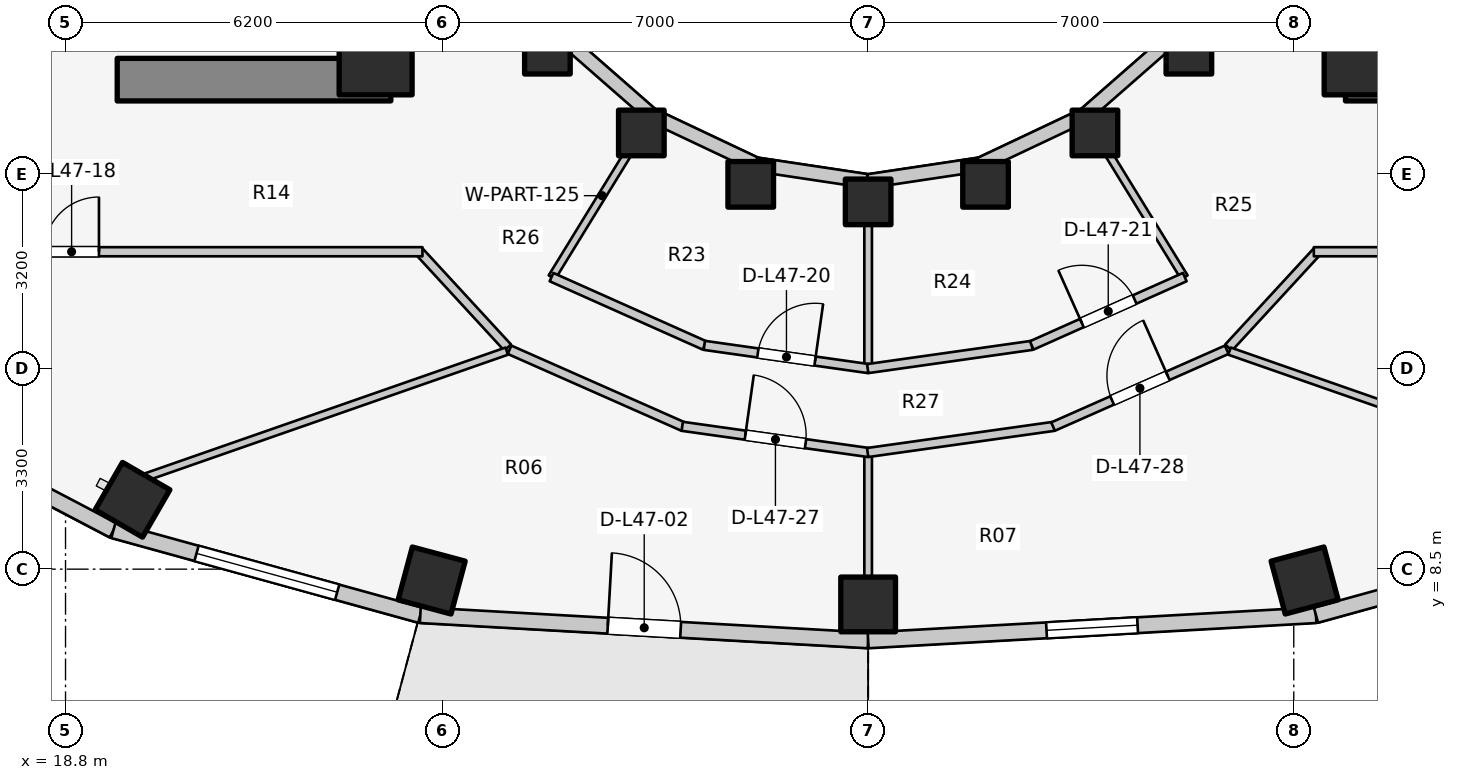
"""IFC4 building model, lengths in metres.
Left out: names, types, materials, properties, quantities, classifications, styles, units other than length and angle.
Written with IfcOpenShell. Run it as: python <this file> out.ifc"""

import sys

from ifc_helpers import new_model, si_unit, direction, frame, frame_2d, origin, origin_2d, place, context, subcontext, project, spatial, rectangle, extrude, element, fill, save


model = new_model("IFC4")
c1 = context("Model", 3, precision=1e-05, world=origin(), true_north=direction((0.0, 1.0)))
c2 = subcontext(c1, "Body", "Model", "MODEL_VIEW")
j1 = project(units=[si_unit("LENGTHUNIT", "METRE"), si_unit("PLANEANGLEUNIT", "RADIAN")], contexts=[c1])
p1 = place(None, origin())
s1 = spatial("IfcSite", under=j1, at=p1, CompositionType="ELEMENT")
p2 = place(p1, origin())
s2 = spatial("IfcBuilding", under=s1, at=p2, CompositionType="ELEMENT")
p3 = place(p2, frame((0.0, 0.0, 156.0)))
s3 = spatial("IfcBuildingStorey", under=s2, at=p3, CompositionType="ELEMENT", Elevation=156.0)
for number, where, z_axis, x_axis in (
    (1, (19.65, 16.55, 0.0), (0.0, 0.0, 1.0), (1.0, 0.0, 0.0)),
    (2, (39.85, 16.55, 0.0), (0.0, 0.0, 1.0), (1.0, 0.0, 0.0)),
):
    element("IfcWall", number, at=place(p3, frame(where, z_axis=z_axis, x_axis=x_axis)), inside=s3, PredefinedType="SHEAR", context=c2, shape_type="SweptSolid", body=[
        extrude(rectangle(XDim=4.5, YDim=0.7, at=frame_2d((2.25, 0.0))), origin(), (0.0, 0.0, 1.0), 3.1),
    ])
for number, where, z_axis, x_axis in (
    (3, (23.9, 16.9, 0.0), (0.0, 0.0, 1.0), (1.0, 0.0, 0.0)),
    (4, (40.1, 16.9, 0.0), (0.0, 0.0, 1.0), (1.0, 0.0, 0.0)),
):
    element("IfcColumn", number, at=place(p3, frame(where, z_axis=z_axis, x_axis=x_axis)), inside=s3, PredefinedType="COLUMN", context=c2, shape_type="SweptSolid", body=[
        extrude(rectangle(XDim=1.2, YDim=1.2, at=origin_2d()), origin(), (0.0, 0.0, 1.0), 3.1),
    ])
for number, where, z_axis, x_axis in (
    (5, (26.725, 17.018, 0.0), (0.0, 0.0, 1.0), (1.0, 0.0, 0.0)),
    (6, (28.27, 15.673, 0.0), (0.0, 0.0, 1.0), (1.0, 0.0, 0.0)),
):
    element("IfcColumn", number, at=place(p3, frame(where, z_axis=z_axis, x_axis=x_axis)), inside=s3, PredefinedType="COLUMN", context=c2, shape_type="SweptSolid", body=[
        extrude(rectangle(XDim=0.75, YDim=0.75, at=origin_2d()), origin(), (0.0, 0.0, 1.0), 3.1),
    ])
p4 = place(p3, frame((19.902, 9.641, 0.0), z_axis=(0.0, 0.0, 1.0), x_axis=(-0.5, -0.866025403784, 0.0)))
e7 = element("IfcColumn", 7, at=p4, inside=s3, PredefinedType="COLUMN", context=c2, shape_type="SweptSolid", body=[
    extrude(rectangle(XDim=0.9, YDim=0.9, at=origin_2d()), origin(), (0.0, 0.0, 1.0), 3.1),
])
p5 = place(p3, frame((30.069, 14.828, 0.0), z_axis=(0.0, 0.0, 1.0), x_axis=(1.0, 0.0, 0.0)))
e8 = element("IfcColumn", 8, at=p5, inside=s3, PredefinedType="COLUMN", context=c2, shape_type="SweptSolid", body=[
    extrude(rectangle(XDim=0.75, YDim=0.75, at=origin_2d()), origin(), (0.0, 0.0, 1.0), 3.1),
])
p6 = place(p3, frame((24.822, 8.313, 0.0), z_axis=(0.0, 0.0, 1.0), x_axis=(-0.258819045103, -0.965925826289, 0.0)))
e9 = element("IfcColumn", 9, at=p6, inside=s3, PredefinedType="COLUMN", context=c2, shape_type="SweptSolid", body=[
    extrude(rectangle(XDim=0.9, YDim=0.9, at=origin_2d()), origin(), (0.0, 0.0, 1.0), 3.1),
])
p7 = place(p3, frame((32.0, 14.54, 0.0), z_axis=(0.0, 0.0, 1.0), x_axis=(1.0, 0.0, 0.0)))
e10 = element("IfcColumn", 10, at=p7, inside=s3, PredefinedType="COLUMN", context=c2, shape_type="SweptSolid", body=[
    extrude(rectangle(XDim=0.75, YDim=0.75, at=origin_2d()), origin(), (0.0, 0.0, 1.0), 3.1),
])
p8 = place(p3, frame((32.0, 7.92, 0.0), z_axis=(0.0, 0.0, 1.0), x_axis=(0.0, -1.0, 0.0)))
e11 = element("IfcColumn", 11, at=p8, inside=s3, PredefinedType="COLUMN", context=c2, shape_type="SweptSolid", body=[
    extrude(rectangle(XDim=0.9, YDim=0.9, at=origin_2d()), origin(), (0.0, 0.0, 1.0), 3.1),
])
p9 = place(p3, frame((33.931, 14.828, 0.0), z_axis=(0.0, 0.0, 1.0), x_axis=(1.0, 0.0, 0.0)))
e12 = element("IfcColumn", 12, at=p9, inside=s3, PredefinedType="COLUMN", context=c2, shape_type="SweptSolid", body=[
    extrude(rectangle(XDim=0.75, YDim=0.75, at=origin_2d()), origin(), (0.0, 0.0, 1.0), 3.1),
])
p10 = place(p3, frame((39.178, 8.313, 0.0), z_axis=(0.0, 0.0, 1.0), x_axis=(0.258819045103, -0.965925826289, 0.0)))
e13 = element("IfcColumn", 13, at=p10, inside=s3, PredefinedType="COLUMN", context=c2, shape_type="SweptSolid", body=[
    extrude(rectangle(XDim=0.9, YDim=0.9, at=origin_2d()), origin(), (0.0, 0.0, 1.0), 3.1),
])
for number, where, z_axis, x_axis in (
    (14, (35.73, 15.673, 0.0), (0.0, 0.0, 1.0), (1.0, 0.0, 0.0)),
    (15, (37.275, 17.018, 0.0), (0.0, 0.0, 1.0), (1.0, 0.0, 0.0)),
):
    element("IfcColumn", number, at=place(p3, frame(where, z_axis=z_axis, x_axis=x_axis)), inside=s3, PredefinedType="COLUMN", context=c2, shape_type="SweptSolid", body=[
        extrude(rectangle(XDim=0.75, YDim=0.75, at=origin_2d()), origin(), (0.0, 0.0, 1.0), 3.1),
    ])
p11 = place(p3, frame((26.965, 17.258, 0.0), z_axis=(0.0, 0.0, 1.0), x_axis=(0.752576694707, -0.658504607869, 0.0)))
e16 = element("IfcWall", 16, at=p11, inside=s3, PredefinedType="STANDARD", context=c2, shape_type="SweptSolid", body=[
    extrude(rectangle(XDim=1.959, YDim=0.23, at=frame_2d((0.98, 0.0))), origin(), (0.0, 0.0, 1.0), 2.16),
])
p12 = place(p3, frame((28.44, 15.968, 0.0), z_axis=(0.0, 0.0, 1.0), x_axis=(0.904179699603, -0.427152280606, 0.0)))
e17 = element("IfcWall", 17, at=p12, inside=s3, PredefinedType="STANDARD", context=c2, shape_type="SweptSolid", body=[
    extrude(rectangle(XDim=1.899, YDim=0.23, at=frame_2d((0.95, 0.0))), origin(), (0.0, 0.0, 1.0), 2.16),
])
for number, where, z_axis, x_axis in (
    (18, (30.157, 15.157, 0.0), (0.0, 0.0, 1.0), (0.989, -0.149, 0.0)),
    (19, (32.0, 14.88, 0.0), (0.0, 0.0, 1.0), (0.989, 0.149, 0.0)),
):
    element("IfcWall", number, at=place(p3, frame(where, z_axis=z_axis, x_axis=x_axis)), inside=s3, PredefinedType="STANDARD", context=c2, shape_type="SweptSolid", body=[
        extrude(rectangle(XDim=1.864, YDim=0.23, at=frame_2d((0.932, 0.0))), origin(), (0.0, 0.0, 1.0), 2.16),
    ])
p13 = place(p3, frame((33.843, 15.157, 0.0), z_axis=(0.0, 0.0, 1.0), x_axis=(0.904179699603, 0.427152280606, 0.0)))
e20 = element("IfcWall", 20, at=p13, inside=s3, PredefinedType="STANDARD", context=c2, shape_type="SweptSolid", body=[
    extrude(rectangle(XDim=1.899, YDim=0.23, at=frame_2d((0.95, 0.0))), origin(), (0.0, 0.0, 1.0), 2.16),
])
p14 = place(p3, frame((35.56, 15.968, 0.0), z_axis=(0.0, 0.0, 1.0), x_axis=(0.752576694707, 0.658504607869, 0.0)))
e21 = element("IfcWall", 21, at=p14, inside=s3, PredefinedType="STANDARD", context=c2, shape_type="SweptSolid", body=[
    extrude(rectangle(XDim=1.959, YDim=0.23, at=frame_2d((0.98, 0.0))), origin(), (0.0, 0.0, 1.0), 2.16),
])
p15 = place(p3, frame((15.731, 11.158, 0.0), z_axis=(0.0, 0.0, 1.0), x_axis=(0.885660265226, -0.464333818065, 0.0)))
e22 = element("IfcWall", 22, at=p15, inside=s3, PredefinedType="STANDARD", context=c2, shape_type="SweptSolid", body=[
    extrude(rectangle(XDim=4.354, YDim=0.26, at=frame_2d((2.177, 0.0))), origin(), (0.0, 0.0, 1.0), 2.85),
])
p16 = place(p3, frame((19.587, 9.137, 0.0), z_axis=(0.0, 0.0, 1.0), x_axis=(0.963953455704, -0.26607092144, 0.0)))
e23 = element("IfcWall", 23, at=p16, inside=s3, PredefinedType="STANDARD", context=c2, shape_type="SweptSolid", body=[
    extrude(rectangle(XDim=5.237, YDim=0.26, at=frame_2d((2.618, 0.0))), origin(), (0.0, 0.0, 1.0), 2.85),
])
p17 = place(p16, frame((1.418, 0.0, 0.75)))
e24 = element("IfcOpeningElement", 24, at=p17, cuts=e23, PredefinedType="OPENING", context=c2, shape_type="SweptSolid", body=[
    extrude(rectangle(XDim=2.4, YDim=1.7, at=frame_2d((1.2, 0.85))), frame((0.0, 0.14, 0.0), z_axis=(0.0, -1.0, 0.0), x_axis=(1.0, 0.0, 0.0)), (0.0, 0.0, 1.0), 0.28),
])
p18 = place(p3, frame((24.635, 7.743, 0.0), z_axis=(0.0, 0.0, 1.0), x_axis=(0.998417906562, -0.056228852534, 0.0)))
e25 = element("IfcWall", 25, at=p18, inside=s3, PredefinedType="STANDARD", context=c2, shape_type="SweptSolid", body=[
    extrude(rectangle(XDim=7.377, YDim=0.26, at=frame_2d((3.688, 0.0))), origin(), (0.0, 0.0, 1.0), 2.88),
])
p19 = place(p18, frame((3.088, 0.0, 0.0)))
e26 = element("IfcOpeningElement", 26, at=p19, cuts=e25, PredefinedType="OPENING", context=c2, shape_type="SweptSolid", body=[
    extrude(rectangle(XDim=1.2, YDim=2.2, at=frame_2d((0.6, 1.1))), frame((0.0, 0.14, 0.0), z_axis=(0.0, -1.0, 0.0), x_axis=(1.0, 0.0, 0.0)), (0.0, 0.0, 1.0), 0.28),
])
p20 = place(p3, frame((32.0, 7.329, 0.0), z_axis=(0.0, 0.0, 1.0), x_axis=(0.998417906562, 0.056228852534, 0.0)))
e27 = element("IfcWall", 27, at=p20, inside=s3, PredefinedType="STANDARD", context=c2, shape_type="SweptSolid", body=[
    extrude(rectangle(XDim=7.377, YDim=0.26, at=frame_2d((3.688, 0.0))), origin(), (0.0, 0.0, 1.0), 2.85),
])
p21 = place(p20, frame((2.938, 0.0, 0.75)))
e28 = element("IfcOpeningElement", 28, at=p21, cuts=e27, PredefinedType="OPENING", context=c2, shape_type="SweptSolid", body=[
    extrude(rectangle(XDim=1.5, YDim=1.6, at=frame_2d((0.75, 0.8))), frame((0.0, 0.14, 0.0), z_axis=(0.0, -1.0, 0.0), x_axis=(1.0, 0.0, 0.0)), (0.0, 0.0, 1.0), 0.28),
])
p22 = place(p3, frame((39.365, 7.743, 0.0), z_axis=(0.0, 0.0, 1.0), x_axis=(0.963953455704, 0.26607092144, 0.0)))
e29 = element("IfcWall", 29, at=p22, inside=s3, PredefinedType="STANDARD", context=c2, shape_type="SweptSolid", body=[
    extrude(rectangle(XDim=5.237, YDim=0.26, at=frame_2d((2.618, 0.0))), origin(), (0.0, 0.0, 1.0), 2.85),
])
p23 = place(p22, frame((1.418, 0.0, 0.75)))
e30 = element("IfcOpeningElement", 30, at=p23, cuts=e29, PredefinedType="OPENING", context=c2, shape_type="SweptSolid", body=[
    extrude(rectangle(XDim=2.4, YDim=1.7, at=frame_2d((1.2, 0.85))), frame((0.0, 0.14, 0.0), z_axis=(0.0, -1.0, 0.0), x_axis=(1.0, 0.0, 0.0)), (0.0, 0.0, 1.0), 0.28),
])
p24 = place(p3, frame((26.072, 12.144, 0.0), z_axis=(0.0, 0.0, 1.0), x_axis=(-0.677579737957, 0.735449317567, 0.0)))
e31 = element("IfcWall", 31, at=p24, inside=s3, PredefinedType="PARTITIONING", context=c2, shape_type="SweptSolid", body=[
    extrude(rectangle(XDim=2.173, YDim=0.15, at=frame_2d((1.086, 0.0))), origin(), (0.0, 0.0, 1.0), 2.299),
])
p25 = place(p3, frame((17.15, 13.72, 0.0), z_axis=(0.0, 0.0, 1.0), x_axis=(1.0, 0.0, 0.0)))
e32 = element("IfcWall", 32, at=p25, inside=s3, PredefinedType="PARTITIONING", context=c2, shape_type="SweptSolid", body=[
    extrude(rectangle(XDim=7.52, YDim=0.15, at=frame_2d((3.76, 0.0))), origin(), (0.0, 0.0, 1.0), 2.299),
])
p26 = place(p25, frame((1.3, 0.0, 0.0)))
e33 = element("IfcOpeningElement", 33, at=p26, cuts=e32, PredefinedType="OPENING", context=c2, shape_type="SweptSolid", body=[
    extrude(rectangle(XDim=0.9, YDim=2.1, at=frame_2d((0.45, 1.05))), frame((0.0, 0.085, 0.0), z_axis=(0.0, -1.0, 0.0), x_axis=(1.0, 0.0, 0.0)), (0.0, 0.0, 1.0), 0.17),
])
p27 = place(p3, frame((37.928, 12.144, 0.0), z_axis=(0.0, 0.0, 1.0), x_axis=(0.677579737957, 0.735449317567, 0.0)))
e34 = element("IfcWall", 34, at=p27, inside=s3, PredefinedType="PARTITIONING", context=c2, shape_type="SweptSolid", body=[
    extrude(rectangle(XDim=2.173, YDim=0.15, at=frame_2d((1.086, 0.0))), origin(), (0.0, 0.0, 1.0), 2.299),
])
p28 = place(p3, frame((39.33, 13.72, 0.0), z_axis=(0.0, 0.0, 1.0), x_axis=(1.0, 0.0, 0.0)))
e35 = element("IfcWall", 35, at=p28, inside=s3, PredefinedType="PARTITIONING", context=c2, shape_type="SweptSolid", body=[
    extrude(rectangle(XDim=7.52, YDim=0.15, at=frame_2d((3.76, 0.0))), origin(), (0.0, 0.0, 1.0), 2.299),
])
p29 = place(p28, frame((5.22, 0.0, 0.0)))
e36 = element("IfcOpeningElement", 36, at=p29, cuts=e35, PredefinedType="OPENING", context=c2, shape_type="SweptSolid", body=[
    extrude(rectangle(XDim=0.9, YDim=2.1, at=frame_2d((0.45, 1.05))), frame((0.0, 0.085, 0.0), z_axis=(0.0, -1.0, 0.0), x_axis=(1.0, 0.0, 0.0)), (0.0, 0.0, 1.0), 0.17),
])
p30 = place(p3, frame((28.45, 15.985, 0.0), z_axis=(0.0, 0.0, 1.0), x_axis=(-0.523587550846, -0.851971875474, 0.0)))
e37 = element("IfcWall", 37, at=p30, inside=s3, PredefinedType="PARTITIONING", context=c2, shape_type="SweptSolid", body=[
    extrude(rectangle(XDim=3.153, YDim=0.125, at=frame_2d((1.577, 0.0))), origin(), (0.0, 0.0, 1.0), 2.299),
])
p31 = place(p3, frame((32.0, 14.9, 0.0), z_axis=(0.0, 0.0, 1.0), x_axis=(0.0, -1.0, 0.0)))
e38 = element("IfcWall", 38, at=p31, inside=s3, PredefinedType="PARTITIONING", context=c2, shape_type="SweptSolid", body=[
    extrude(rectangle(XDim=3.102, YDim=0.125, at=frame_2d((1.551, 0.0))), origin(), (0.0, 0.0, 1.0), 2.299),
])
p32 = place(p3, frame((35.55, 15.985, 0.0), z_axis=(0.0, 0.0, 1.0), x_axis=(0.523587550846, -0.851971875474, 0.0)))
e39 = element("IfcWall", 39, at=p32, inside=s3, PredefinedType="PARTITIONING", context=c2, shape_type="SweptSolid", body=[
    extrude(rectangle(XDim=3.153, YDim=0.125, at=frame_2d((1.577, 0.0))), origin(), (0.0, 0.0, 1.0), 2.299),
])
p33 = place(p3, frame((26.793, 13.303, 0.0), z_axis=(0.0, 0.0, 1.0), x_axis=(0.913145536541, -0.407633694749, 0.0)))
e40 = element("IfcWall", 40, at=p33, inside=s3, PredefinedType="PARTITIONING", context=c2, shape_type="SweptSolid", body=[
    extrude(rectangle(XDim=2.756, YDim=0.15, at=frame_2d((1.378, 0.0))), origin(), (0.0, 0.0, 1.0), 2.299),
])
p34 = place(p3, frame((29.306, 12.18, 0.0), z_axis=(0.0, 0.0, 1.0), x_axis=(0.990145400278, -0.140043158738, 0.0)))
e41 = element("IfcWall", 41, at=p34, inside=s3, PredefinedType="PARTITIONING", context=c2, shape_type="SweptSolid", body=[
    extrude(rectangle(XDim=2.728, YDim=0.15, at=frame_2d((1.364, 0.0))), origin(), (0.0, 0.0, 1.0), 2.299),
])
p35 = place(p34, frame((0.889, 0.0, 0.0)))
e42 = element("IfcOpeningElement", 42, at=p35, cuts=e41, PredefinedType="OPENING", context=c2, shape_type="SweptSolid", body=[
    extrude(rectangle(XDim=0.95, YDim=2.1, at=frame_2d((0.475, 1.05))), frame((0.0, 0.085, 0.0), z_axis=(0.0, -1.0, 0.0), x_axis=(1.0, 0.0, 0.0)), (0.0, 0.0, 1.0), 0.17),
])
p36 = place(p3, frame((31.993, 11.798, 0.0), z_axis=(0.0, 0.0, 1.0), x_axis=(0.990145400278, 0.140043158738, 0.0)))
e43 = element("IfcWall", 43, at=p36, inside=s3, PredefinedType="PARTITIONING", context=c2, shape_type="SweptSolid", body=[
    extrude(rectangle(XDim=2.728, YDim=0.15, at=frame_2d((1.364, 0.0))), origin(), (0.0, 0.0, 1.0), 2.299),
])
p37 = place(p3, frame((34.69, 12.179, 0.0), z_axis=(0.0, 0.0, 1.0), x_axis=(0.913145536541, 0.407633694749, 0.0)))
e44 = element("IfcWall", 44, at=p37, inside=s3, PredefinedType="PARTITIONING", context=c2, shape_type="SweptSolid", body=[
    extrude(rectangle(XDim=2.756, YDim=0.15, at=frame_2d((1.378, 0.0))), origin(), (0.0, 0.0, 1.0), 2.299),
])
p38 = place(p37, frame((0.903, 0.0, 0.0)))
e45 = element("IfcOpeningElement", 45, at=p38, cuts=e44, PredefinedType="OPENING", context=c2, shape_type="SweptSolid", body=[
    extrude(rectangle(XDim=0.95, YDim=2.1, at=frame_2d((0.475, 1.05))), frame((0.0, 0.085, 0.0), z_axis=(0.0, -1.0, 0.0), x_axis=(1.0, 0.0, 0.0)), (0.0, 0.0, 1.0), 0.17),
])
p39 = place(p3, frame((26.057, 12.086, 0.0), z_axis=(0.0, 0.0, 1.0), x_axis=(-0.944182779284, -0.329422038278, 0.0)))
e46 = element("IfcWall", 46, at=p39, inside=s3, PredefinedType="PARTITIONING", context=c2, shape_type="SweptSolid", body=[
    extrude(rectangle(XDim=6.291, YDim=0.125, at=frame_2d((3.146, 0.0))), origin(), (0.0, 0.0, 1.0), 2.299),
])
p40 = place(p3, frame((32.0, 10.363, 0.0), z_axis=(0.0, 0.0, 1.0), x_axis=(0.0, -1.0, 0.0)))
e47 = element("IfcWall", 47, at=p40, inside=s3, PredefinedType="PARTITIONING", context=c2, shape_type="SweptSolid", body=[
    extrude(rectangle(XDim=2.013, YDim=0.125, at=frame_2d((1.006, 0.0))), origin(), (0.0, 0.0, 1.0), 2.299),
])
p41 = place(p3, frame((37.943, 12.086, 0.0), z_axis=(0.0, 0.0, 1.0), x_axis=(0.944182779284, -0.329422038278, 0.0)))
e48 = element("IfcWall", 48, at=p41, inside=s3, PredefinedType="PARTITIONING", context=c2, shape_type="SweptSolid", body=[
    extrude(rectangle(XDim=6.291, YDim=0.125, at=frame_2d((3.146, 0.0))), origin(), (0.0, 0.0, 1.0), 2.299),
])
p42 = place(p3, frame((26.102, 12.108, 0.0), z_axis=(0.0, 0.0, 1.0), x_axis=(0.914519212393, -0.40454247016, 0.0)))
e49 = element("IfcWall", 49, at=p42, inside=s3, PredefinedType="PARTITIONING", context=c2, shape_type="SweptSolid", body=[
    extrude(rectangle(XDim=3.124, YDim=0.15, at=frame_2d((1.562, 0.0))), origin(), (0.0, 0.0, 1.0), 2.299),
])
p43 = place(p3, frame((28.943, 10.849, 0.0), z_axis=(0.0, 0.0, 1.0), x_axis=(0.990254709652, -0.13926812274, 0.0)))
e50 = element("IfcWall", 50, at=p43, inside=s3, PredefinedType="PARTITIONING", context=c2, shape_type="SweptSolid", body=[
    extrude(rectangle(XDim=3.096, YDim=0.15, at=frame_2d((1.548, 0.0))), origin(), (0.0, 0.0, 1.0), 2.299),
])
p44 = place(p43, frame((1.048, 0.0, 0.0)))
e51 = element("IfcOpeningElement", 51, at=p44, cuts=e50, PredefinedType="OPENING", context=c2, shape_type="SweptSolid", body=[
    extrude(rectangle(XDim=1.0, YDim=2.1, at=frame_2d((0.5, 1.05))), frame((0.0, 0.085, 0.0), z_axis=(0.0, -1.0, 0.0), x_axis=(1.0, 0.0, 0.0)), (0.0, 0.0, 1.0), 0.17),
])
p45 = place(p3, frame((31.992, 10.418, 0.0), z_axis=(0.0, 0.0, 1.0), x_axis=(0.990254709652, 0.13926812274, 0.0)))
e52 = element("IfcWall", 52, at=p45, inside=s3, PredefinedType="PARTITIONING", context=c2, shape_type="SweptSolid", body=[
    extrude(rectangle(XDim=3.096, YDim=0.15, at=frame_2d((1.548, 0.0))), origin(), (0.0, 0.0, 1.0), 2.299),
])
p46 = place(p3, frame((35.042, 10.844, 0.0), z_axis=(0.0, 0.0, 1.0), x_axis=(0.914519212393, 0.40454247016, 0.0)))
e53 = element("IfcWall", 53, at=p46, inside=s3, PredefinedType="PARTITIONING", context=c2, shape_type="SweptSolid", body=[
    extrude(rectangle(XDim=3.124, YDim=0.15, at=frame_2d((1.562, 0.0))), origin(), (0.0, 0.0, 1.0), 2.299),
])
p47 = place(p46, frame((1.062, 0.0, 0.0)))
e54 = element("IfcOpeningElement", 54, at=p47, cuts=e53, PredefinedType="OPENING", context=c2, shape_type="SweptSolid", body=[
    extrude(rectangle(XDim=1.0, YDim=2.1, at=frame_2d((0.5, 1.05))), frame((0.0, 0.085, 0.0), z_axis=(0.0, -1.0, 0.0), x_axis=(1.0, 0.0, 0.0)), (0.0, 0.0, 1.0), 0.17),
])
p48 = place(p17, origin())
e55 = element("IfcWindow", 55, at=p48, inside=s3, PartitioningType="SINGLE_PANEL", PredefinedType="WINDOW", context=c2, shape_type="SweptSolid", body=[
    extrude(rectangle(XDim=2.4, YDim=1.7, at=frame_2d((1.2, 0.85))), frame((0.0, 0.03, 0.0), z_axis=(0.0, -1.0, 0.0), x_axis=(1.0, 0.0, 0.0)), (0.0, 0.0, 1.0), 0.06),
])
fill(e24, e55)
p49 = place(p19, origin())
e56 = element("IfcDoor", 56, at=p49, inside=s3, OperationType="SINGLE_SWING_LEFT", PredefinedType="DOOR", context=c2, shape_type="SweptSolid", body=[
    extrude(rectangle(XDim=1.2, YDim=2.2, at=frame_2d((0.6, 1.1))), frame((0.0, 0.025, 0.0), z_axis=(0.0, -1.0, 0.0), x_axis=(1.0, 0.0, 0.0)), (0.0, 0.0, 1.0), 0.05),
])
fill(e26, e56)
p50 = place(p21, origin())
e57 = element("IfcWindow", 57, at=p50, inside=s3, PartitioningType="SINGLE_PANEL", PredefinedType="WINDOW", context=c2, shape_type="SweptSolid", body=[
    extrude(rectangle(XDim=1.5, YDim=1.6, at=frame_2d((0.75, 0.8))), frame((0.0, 0.03, 0.0), z_axis=(0.0, -1.0, 0.0), x_axis=(1.0, 0.0, 0.0)), (0.0, 0.0, 1.0), 0.06),
])
fill(e28, e57)
p51 = place(p26, origin())
e58 = element("IfcDoor", 58, at=p51, inside=s3, OperationType="SINGLE_SWING_RIGHT", PredefinedType="DOOR", context=c2, shape_type="SweptSolid", body=[
    extrude(rectangle(XDim=0.9, YDim=2.1, at=frame_2d((0.45, 1.05))), frame((0.0, 0.025, 0.0), z_axis=(0.0, -1.0, 0.0), x_axis=(1.0, 0.0, 0.0)), (0.0, 0.0, 1.0), 0.05),
])
fill(e33, e58)
p52 = place(p35, origin())
e59 = element("IfcDoor", 59, at=p52, inside=s3, OperationType="SINGLE_SWING_RIGHT", PredefinedType="DOOR", context=c2, shape_type="SweptSolid", body=[
    extrude(rectangle(XDim=0.95, YDim=2.1, at=frame_2d((0.475, 1.05))), frame((0.0, 0.025, 0.0), z_axis=(0.0, -1.0, 0.0), x_axis=(1.0, 0.0, 0.0)), (0.0, 0.0, 1.0), 0.05),
])
fill(e42, e59)
p53 = place(p38, origin())
e60 = element("IfcDoor", 60, at=p53, inside=s3, OperationType="SINGLE_SWING_LEFT", PredefinedType="DOOR", context=c2, shape_type="SweptSolid", body=[
    extrude(rectangle(XDim=0.95, YDim=2.1, at=frame_2d((0.475, 1.05))), frame((0.0, 0.025, 0.0), z_axis=(0.0, -1.0, 0.0), x_axis=(1.0, 0.0, 0.0)), (0.0, 0.0, 1.0), 0.05),
])
fill(e45, e60)
p54 = place(p44, origin())
e61 = element("IfcDoor", 61, at=p54, inside=s3, OperationType="SINGLE_SWING_LEFT", PredefinedType="DOOR", context=c2, shape_type="SweptSolid", body=[
    extrude(rectangle(XDim=1.0, YDim=2.1, at=frame_2d((0.5, 1.05))), frame((0.0, 0.025, 0.0), z_axis=(0.0, -1.0, 0.0), x_axis=(1.0, 0.0, 0.0)), (0.0, 0.0, 1.0), 0.05),
])
fill(e51, e61)
p55 = place(p47, origin())
e62 = element("IfcDoor", 62, at=p55, inside=s3, OperationType="SINGLE_SWING_RIGHT", PredefinedType="DOOR", context=c2, shape_type="SweptSolid", body=[
    extrude(rectangle(XDim=1.0, YDim=2.1, at=frame_2d((0.5, 1.05))), frame((0.0, 0.025, 0.0), z_axis=(0.0, -1.0, 0.0), x_axis=(1.0, 0.0, 0.0)), (0.0, 0.0, 1.0), 0.05),
])
fill(e54, e62)
save(model, sys.argv[1])
